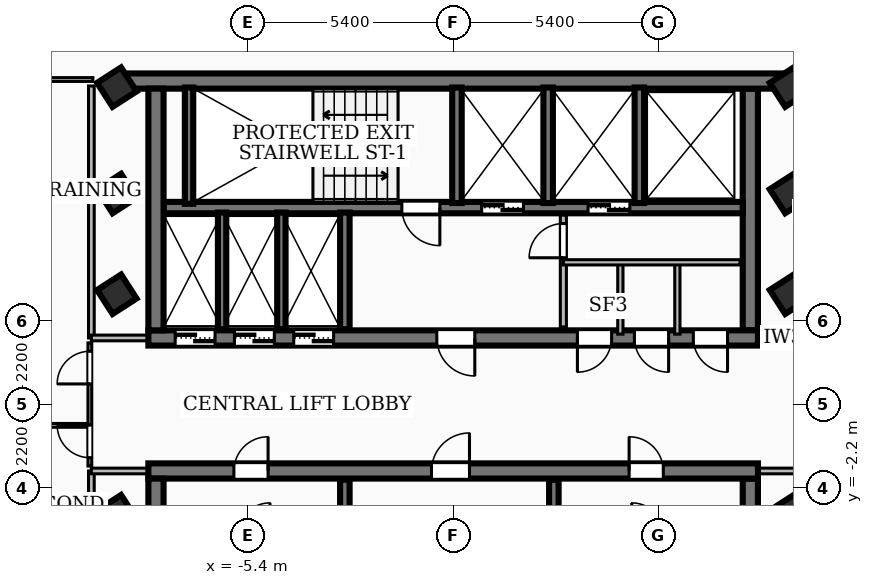
"""IFC4 building model, lengths in metres.
Left out: names, types, materials, properties, quantities, classifications, styles, units other than length and angle.
Written with IfcOpenShell. Run it as: python <this file> out.ifc"""

import sys

from ifc_helpers import new_model, si_unit, direction, frame, frame_2d, origin, origin_2d, place, context, subcontext, project, spatial, rectangle, extrude, element, fill, save


model = new_model("IFC4")
c1 = context("Model", 3, precision=1e-05, world=origin(), true_north=direction((0.0, 1.0)))
c2 = subcontext(c1, "Body", "Model", "MODEL_VIEW")
j1 = project(units=[si_unit("LENGTHUNIT", "METRE"), si_unit("PLANEANGLEUNIT", "RADIAN")], contexts=[c1])
p1 = place(None, origin())
s1 = spatial("IfcSite", under=j1, at=p1, CompositionType="ELEMENT")
p2 = place(p1, origin())
s2 = spatial("IfcBuilding", under=s1, at=p2, CompositionType="ELEMENT")
p3 = place(p2, frame((0.0, 0.0, 218.88)))
s3 = spatial("IfcBuildingStorey", under=s2, at=p3, CompositionType="ELEMENT", Elevation=218.88)
p4 = place(p3, frame((-8.78, 8.51, 0.0), z_axis=(0.0, 0.0, 1.0), x_axis=(1.0, 0.0, 0.0)))
e1 = element("IfcWall", 1, at=p4, inside=s3, PredefinedType="SHEAR", context=c2, shape_type="SweptSolid", body=[
    extrude(rectangle(XDim=17.56, YDim=0.4, at=frame_2d((8.78, 0.0))), origin(), (0.0, 0.0, 1.0), 3.14),
])
p5 = place(p3, frame((8.02, 1.75, 0.0), z_axis=(0.0, 0.0, 1.0), x_axis=(-1.0, 0.0, 0.0)))
e2 = element("IfcWall", 2, at=p5, inside=s3, PredefinedType="SHEAR", context=c2, shape_type="SweptSolid", body=[
    extrude(rectangle(XDim=16.04, YDim=0.4, at=frame_2d((8.02, 0.0))), origin(), (0.0, 0.0, 1.0), 3.14),
])
p6 = place(p5, frame((7.45, 0.0, 0.0)))
e3 = element("IfcOpeningElement", 3, at=p6, cuts=e2, PredefinedType="OPENING", context=c2, shape_type="SweptSolid", body=[
    extrude(rectangle(XDim=1.0, YDim=2.1, at=frame_2d((0.5, 1.05))), frame((0.0, 0.21, 0.0), z_axis=(0.0, -1.0, 0.0), x_axis=(1.0, 0.0, 0.0)), (0.0, 0.0, 1.0), 0.42),
])
p7 = place(p5, frame((14.285, 0.0, 0.0)))
e4 = element("IfcOpeningElement", 4, at=p7, cuts=e2, PredefinedType="OPENING", context=c2, shape_type="SweptSolid", body=[
    extrude(rectangle(XDim=1.05, YDim=2.15, at=frame_2d((0.525, 1.075))), frame((0.0, 0.21, 0.0), z_axis=(0.0, -1.0, 0.0), x_axis=(1.0, 0.0, 0.0)), (0.0, 0.0, 1.0), 0.42),
])
p8 = place(p5, frame((12.725, 0.0, 0.0)))
e5 = element("IfcOpeningElement", 5, at=p8, cuts=e2, PredefinedType="OPENING", context=c2, shape_type="SweptSolid", body=[
    extrude(rectangle(XDim=1.05, YDim=2.15, at=frame_2d((0.525, 1.075))), frame((0.0, 0.21, 0.0), z_axis=(0.0, -1.0, 0.0), x_axis=(1.0, 0.0, 0.0)), (0.0, 0.0, 1.0), 0.42),
])
p9 = place(p5, frame((11.165, 0.0, 0.0)))
e6 = element("IfcOpeningElement", 6, at=p9, cuts=e2, PredefinedType="OPENING", context=c2, shape_type="SweptSolid", body=[
    extrude(rectangle(XDim=1.05, YDim=2.15, at=frame_2d((0.525, 1.075))), frame((0.0, 0.21, 0.0), z_axis=(0.0, -1.0, 0.0), x_axis=(1.0, 0.0, 0.0)), (0.0, 0.0, 1.0), 0.42),
])
p10 = place(p5, frame((3.85, 0.0, 0.0)))
e7 = element("IfcOpeningElement", 7, at=p10, cuts=e2, PredefinedType="OPENING", context=c2, shape_type="SweptSolid", body=[
    extrude(rectangle(XDim=0.9, YDim=2.06, at=frame_2d((0.45, 1.03))), frame((0.0, 0.21, 0.0), z_axis=(0.0, -1.0, 0.0), x_axis=(1.0, 0.0, 0.0)), (0.0, 0.0, 1.0), 0.42),
])
p11 = place(p5, frame((2.35, 0.0, 0.0)))
e8 = element("IfcOpeningElement", 8, at=p11, cuts=e2, PredefinedType="OPENING", context=c2, shape_type="SweptSolid", body=[
    extrude(rectangle(XDim=0.9, YDim=2.06, at=frame_2d((0.45, 1.03))), frame((0.0, 0.21, 0.0), z_axis=(0.0, -1.0, 0.0), x_axis=(1.0, 0.0, 0.0)), (0.0, 0.0, 1.0), 0.42),
])
p12 = place(p5, frame((0.8, 0.0, 0.0)))
e9 = element("IfcOpeningElement", 9, at=p12, cuts=e2, PredefinedType="OPENING", context=c2, shape_type="SweptSolid", body=[
    extrude(rectangle(XDim=0.9, YDim=2.06, at=frame_2d((0.45, 1.03))), frame((0.0, 0.21, 0.0), z_axis=(0.0, -1.0, 0.0), x_axis=(1.0, 0.0, 0.0)), (0.0, 0.0, 1.0), 0.42),
])
for number, where, z_axis, x_axis in (
    (10, (-7.82, 1.95, 0.0), (0.0, 0.0, 1.0), (0.0, 1.0, 0.0)),
    (11, (7.82, 8.31, 0.0), (0.0, 0.0, 1.0), (0.0, -1.0, 0.0)),
):
    element("IfcWall", number, at=place(p3, frame(where, z_axis=z_axis, x_axis=x_axis)), inside=s3, PredefinedType="SHEAR", context=c2, shape_type="SweptSolid", body=[
        extrude(rectangle(XDim=6.36, YDim=0.4, at=frame_2d((3.18, 0.0))), origin(), (0.0, 0.0, 1.0), 3.14),
    ])
p13 = place(p3, frame((7.62, 5.18, 0.0), z_axis=(0.0, 0.0, 1.0), x_axis=(-1.0, 0.0, 0.0)))
e12 = element("IfcWall", 12, at=p13, inside=s3, PredefinedType="SOLIDWALL", context=c2, shape_type="SweptSolid", body=[
    extrude(rectangle(XDim=15.24, YDim=0.3, at=frame_2d((7.62, 0.0))), origin(), (0.0, 0.0, 1.0), 3.14),
])
p14 = place(p13, frame((5.77, 0.0, 0.0)))
e13 = element("IfcOpeningElement", 13, at=p14, cuts=e12, PredefinedType="OPENING", context=c2, shape_type="SweptSolid", body=[
    extrude(rectangle(XDim=1.1, YDim=2.15, at=frame_2d((0.55, 1.075))), frame((0.0, 0.16, 0.0), z_axis=(0.0, -1.0, 0.0), x_axis=(1.0, 0.0, 0.0)), (0.0, 0.0, 1.0), 0.32),
])
p15 = place(p13, frame((2.97, 0.0, 0.0)))
e14 = element("IfcOpeningElement", 14, at=p15, cuts=e12, PredefinedType="OPENING", context=c2, shape_type="SweptSolid", body=[
    extrude(rectangle(XDim=1.1, YDim=2.15, at=frame_2d((0.55, 1.075))), frame((0.0, 0.16, 0.0), z_axis=(0.0, -1.0, 0.0), x_axis=(1.0, 0.0, 0.0)), (0.0, 0.0, 1.0), 0.32),
])
p16 = place(p13, frame((7.97, 0.0, 0.0)))
e15 = element("IfcOpeningElement", 15, at=p16, cuts=e12, PredefinedType="OPENING", context=c2, shape_type="SweptSolid", body=[
    extrude(rectangle(XDim=1.0, YDim=2.1, at=frame_2d((0.5, 1.05))), frame((0.0, 0.16, 0.0), z_axis=(0.0, -1.0, 0.0), x_axis=(1.0, 0.0, 0.0)), (0.0, 0.0, 1.0), 0.32),
])
p17 = place(p3, frame((-8.02, -1.75, 0.0), z_axis=(0.0, 0.0, 1.0), x_axis=(1.0, 0.0, 0.0)))
e16 = element("IfcWall", 16, at=p17, inside=s3, PredefinedType="SHEAR", context=c2, shape_type="SweptSolid", body=[
    extrude(rectangle(XDim=16.04, YDim=0.4, at=frame_2d((8.02, 0.0))), origin(), (0.0, 0.0, 1.0), 3.14),
])
p18 = place(p17, frame((7.45, 0.0, 0.0)))
e17 = element("IfcOpeningElement", 17, at=p18, cuts=e16, PredefinedType="OPENING", context=c2, shape_type="SweptSolid", body=[
    extrude(rectangle(XDim=1.0, YDim=2.1, at=frame_2d((0.5, 1.05))), frame((0.0, 0.21, 0.0), z_axis=(0.0, -1.0, 0.0), x_axis=(1.0, 0.0, 0.0)), (0.0, 0.0, 1.0), 0.42),
])
p19 = place(p17, frame((12.65, 0.0, 0.0)))
e18 = element("IfcOpeningElement", 18, at=p19, cuts=e16, PredefinedType="OPENING", context=c2, shape_type="SweptSolid", body=[
    extrude(rectangle(XDim=0.9, YDim=2.06, at=frame_2d((0.45, 1.03))), frame((0.0, 0.21, 0.0), z_axis=(0.0, -1.0, 0.0), x_axis=(1.0, 0.0, 0.0)), (0.0, 0.0, 1.0), 0.42),
])
p20 = place(p17, frame((2.25, 0.0, 0.0)))
e19 = element("IfcOpeningElement", 19, at=p20, cuts=e16, PredefinedType="OPENING", context=c2, shape_type="SweptSolid", body=[
    extrude(rectangle(XDim=0.9, YDim=2.06, at=frame_2d((0.45, 1.03))), frame((0.0, 0.21, 0.0), z_axis=(0.0, -1.0, 0.0), x_axis=(1.0, 0.0, 0.0)), (0.0, 0.0, 1.0), 0.42),
])
for number, where, z_axis, x_axis in (
    (20, (-7.82, -8.31, 0.0), (0.0, 0.0, 1.0), (0.0, 1.0, 0.0)),
    (21, (7.82, -1.95, 0.0), (0.0, 0.0, 1.0), (0.0, -1.0, 0.0)),
):
    element("IfcWall", number, at=place(p3, frame(where, z_axis=z_axis, x_axis=x_axis)), inside=s3, PredefinedType="SHEAR", context=c2, shape_type="SweptSolid", body=[
        extrude(rectangle(XDim=6.36, YDim=0.4, at=frame_2d((3.18, 0.0))), origin(), (0.0, 0.0, 1.0), 3.14),
    ])
p21 = place(p3, frame((-6.95, 5.28, 0.0), z_axis=(0.0, 0.0, 1.0), x_axis=(0.0, 1.0, 0.0)))
e22 = element("IfcWall", 22, at=p21, inside=s3, PredefinedType="SOLIDWALL", context=c2, shape_type="SweptSolid", body=[
    extrude(rectangle(XDim=3.06, YDim=0.22, at=frame_2d((1.53, 0.0))), origin(), (0.0, 0.0, 1.0), 3.14),
])
for number, where, z_axis, x_axis in (
    (23, (0.1, 5.3, 0.0), (0.0, 0.0, 1.0), (0.0, 1.0, 0.0)),
    (24, (2.5, 5.3, 0.0), (0.0, 0.0, 1.0), (0.0, 1.0, 0.0)),
    (25, (4.9, 5.3, 0.0), (0.0, 0.0, 1.0), (0.0, 1.0, 0.0)),
):
    element("IfcWall", number, at=place(p3, frame(where, z_axis=z_axis, x_axis=x_axis)), inside=s3, PredefinedType="SOLIDWALL", context=c2, shape_type="SweptSolid", body=[
        extrude(rectangle(XDim=3.04, YDim=0.25, at=frame_2d((1.52, 0.0))), origin(), (0.0, 0.0, 1.0), 3.14),
    ])
for number, where, z_axis, x_axis in (
    (26, (-2.85, 1.98, 0.0), (0.0, 0.0, 1.0), (0.0, 1.0, 0.0)),
    (27, (-2.85, -5.05, 0.0), (0.0, 0.0, 1.0), (0.0, 1.0, 0.0)),
    (28, (2.65, -5.05, 0.0), (0.0, 0.0, 1.0), (0.0, 1.0, 0.0)),
):
    element("IfcWall", number, at=place(p3, frame(where, z_axis=z_axis, x_axis=x_axis)), inside=s3, PredefinedType="SOLIDWALL", context=c2, shape_type="SweptSolid", body=[
        extrude(rectangle(XDim=3.07, YDim=0.25, at=frame_2d((1.535, 0.0))), origin(), (0.0, 0.0, 1.0), 3.14),
    ])
for number, where, z_axis, x_axis in (
    (29, (-6.08, 1.98, 0.0), (0.0, 0.0, 1.0), (0.0, 1.0, 0.0)),
    (30, (-4.52, 1.98, 0.0), (0.0, 0.0, 1.0), (0.0, 1.0, 0.0)),
):
    element("IfcWall", number, at=place(p3, frame(where, z_axis=z_axis, x_axis=x_axis)), inside=s3, PredefinedType="SOLIDWALL", context=c2, shape_type="SweptSolid", body=[
        extrude(rectangle(XDim=3.07, YDim=0.22, at=frame_2d((1.535, 0.0))), origin(), (0.0, 0.0, 1.0), 3.14),
    ])
for number, where, z_axis, x_axis in (
    (31, (-8.85, -2.9, 0.0), (0.0, 0.0, 1.0), (0.841, 0.542, 0.0)),
    (32, (-8.85, 2.9, 0.0), (0.0, 0.0, 1.0), (0.841, 0.542, 0.0)),
    (33, (-8.85, 5.55, 0.0), (0.0, 0.0, 1.0), (0.841, 0.542, 0.0)),
    (34, (8.85, -2.9, 0.0), (0.0, 0.0, 1.0), (0.841, 0.542, 0.0)),
    (35, (8.85, 2.9, 0.0), (0.0, 0.0, 1.0), (0.841, 0.542, 0.0)),
    (36, (8.85, 5.55, 0.0), (0.0, 0.0, 1.0), (0.841, 0.542, 0.0)),
    (37, (-8.85, 8.35, 0.0), (0.0, 0.0, 1.0), (0.841, 0.542, 0.0)),
    (38, (8.85, 8.35, 0.0), (0.0, 0.0, 1.0), (0.841, 0.542, 0.0)),
):
    element("IfcColumn", number, at=place(p3, frame(where, z_axis=z_axis, x_axis=x_axis)), inside=s3, PredefinedType="COLUMN", context=c2, shape_type="SweptSolid", body=[
        extrude(rectangle(XDim=0.75, YDim=0.75, at=origin_2d()), origin(), (0.0, 0.0, 1.0), 3.42),
    ])
p22 = place(p3, frame((-5.124, -18.723, 0.0), z_axis=(0.0, 0.0, 1.0), x_axis=(-0.541724400477, 0.840556169407, 0.0)))
e39 = element("IfcWall", 39, at=p22, inside=s3, PredefinedType="SOLIDWALL", context=c2, shape_type="SweptSolid", body=[
    extrude(rectangle(XDim=25.925, YDim=0.2, at=frame_2d((12.962, 0.0))), origin(), (0.0, 0.0, 1.0), 3.14),
])
p23 = place(p22, frame((19.321, 0.0, 0.85)))
e40 = element("IfcOpeningElement", 40, at=p23, cuts=e39, PredefinedType="OPENING", context=c2, shape_type="SweptSolid", body=[
    extrude(rectangle(XDim=1.8, YDim=1.8, at=frame_2d((0.9, 0.9))), frame((0.0, 0.11, 0.0), z_axis=(0.0, -1.0, 0.0), x_axis=(1.0, 0.0, 0.0)), (0.0, 0.0, 1.0), 0.22),
])
p24 = place(p3, frame((2.9, 2.04, 0.0), z_axis=(0.0, 0.0, 1.0), x_axis=(0.0, 1.0, 0.0)))
e41 = element("IfcWall", 41, at=p24, inside=s3, PredefinedType="PARTITIONING", context=c2, shape_type="SweptSolid", body=[
    extrude(rectangle(XDim=2.94, YDim=0.16, at=frame_2d((1.47, 0.0))), origin(), (0.0, 0.0, 1.0), 2.37),
])
p25 = place(p24, frame((1.82, 0.0, 0.0)))
e42 = element("IfcOpeningElement", 42, at=p25, cuts=e41, PredefinedType="OPENING", context=c2, shape_type="SweptSolid", body=[
    extrude(rectangle(XDim=0.9, YDim=2.06, at=frame_2d((0.45, 1.03))), frame((0.0, 0.09, 0.0), z_axis=(0.0, -1.0, 0.0), x_axis=(1.0, 0.0, 0.0)), (0.0, 0.0, 1.0), 0.18),
])
p26 = place(p3, frame((2.9, 3.74, 0.0), z_axis=(0.0, 0.0, 1.0), x_axis=(1.0, 0.0, 0.0)))
e43 = element("IfcWall", 43, at=p26, inside=s3, PredefinedType="PARTITIONING", context=c2, shape_type="SweptSolid", body=[
    extrude(rectangle(XDim=4.65, YDim=0.138, at=frame_2d((2.325, 0.0))), origin(), (0.0, 0.0, 1.0), 3.14),
])
for number, where, z_axis, x_axis in (
    (44, (4.4, 1.85, 0.0), (0.0, 0.0, 1.0), (0.0, 1.0, 0.0)),
    (45, (5.9, 1.85, 0.0), (0.0, 0.0, 1.0), (0.0, 1.0, 0.0)),
):
    element("IfcWall", number, at=place(p3, frame(where, z_axis=z_axis, x_axis=x_axis)), inside=s3, PredefinedType="PARTITIONING", context=c2, shape_type="SweptSolid", body=[
        extrude(rectangle(XDim=1.89, YDim=0.138, at=frame_2d((0.945, 0.0))), origin(), (0.0, 0.0, 1.0), 2.37),
    ])
p27 = place(p3, frame((-9.52, 1.75, 0.0), z_axis=(0.0, 0.0, 1.0), x_axis=(0.0, 1.0, 0.0)))
e46 = element("IfcWall", 46, at=p27, inside=s3, PredefinedType="PARTITIONING", context=c2, shape_type="SweptSolid", body=[
    extrude(rectangle(XDim=6.63, YDim=0.15, at=frame_2d((3.315, 0.0))), origin(), (0.0, 0.0, 1.0), 3.14),
])
p28 = place(p3, frame((-7.85, 1.75, 0.0), z_axis=(0.0, 0.0, 1.0), x_axis=(-1.0, 0.0, 0.0)))
e47 = element("IfcWall", 47, at=p28, inside=s3, PredefinedType="PARTITIONING", context=c2, shape_type="SweptSolid", body=[
    extrude(rectangle(XDim=1.67, YDim=0.15, at=frame_2d((0.835, 0.0))), origin(), (0.0, 0.0, 1.0), 2.37),
])
p29 = place(p3, frame((-9.52, -8.38, 0.0), z_axis=(0.0, 0.0, 1.0), x_axis=(0.0, 1.0, 0.0)))
e48 = element("IfcWall", 48, at=p29, inside=s3, PredefinedType="PARTITIONING", context=c2, shape_type="SweptSolid", body=[
    extrude(rectangle(XDim=6.63, YDim=0.15, at=frame_2d((3.315, 0.0))), origin(), (0.0, 0.0, 1.0), 3.14),
])
for number, where, z_axis, x_axis in (
    (49, (-7.85, -1.75, 0.0), (0.0, 0.0, 1.0), (-1.0, 0.0, 0.0)),
    (50, (7.85, 1.75, 0.0), (0.0, 0.0, 1.0), (1.0, 0.0, 0.0)),
    (51, (7.85, -1.75, 0.0), (0.0, 0.0, 1.0), (1.0, 0.0, 0.0)),
):
    element("IfcWall", number, at=place(p3, frame(where, z_axis=z_axis, x_axis=x_axis)), inside=s3, PredefinedType="PARTITIONING", context=c2, shape_type="SweptSolid", body=[
        extrude(rectangle(XDim=1.67, YDim=0.15, at=frame_2d((0.835, 0.0))), origin(), (0.0, 0.0, 1.0), 2.37),
    ])
p30 = place(p3, frame((-16.759, -0.55, 0.0), z_axis=(0.0, 0.0, 1.0), x_axis=(1.0, 0.0, 0.0)))
e52 = element("IfcWall", 52, at=p30, inside=s3, PredefinedType="PARTITIONING", context=c2, shape_type="SweptSolid", body=[
    extrude(rectangle(XDim=7.099, YDim=0.1, at=frame_2d((3.55, 0.0))), origin(), (0.0, 0.0, 1.0), 3.14),
])
p31 = place(p3, frame((-13.306, 8.55, 0.0), z_axis=(0.0, 0.0, 1.0), x_axis=(1.0, 0.0, 0.0)))
e53 = element("IfcWall", 53, at=p31, inside=s3, PredefinedType="PARTITIONING", context=c2, shape_type="SweptSolid", body=[
    extrude(rectangle(XDim=3.826, YDim=0.1, at=frame_2d((1.913, 0.0))), origin(), (0.0, 0.0, 1.0), 2.51),
])
p32 = place(p3, frame((-9.56, -1.62, 0.0), z_axis=(0.0, 0.0, 1.0), x_axis=(0.0, 1.0, 0.0)))
e54 = element("IfcWall", 54, at=p32, inside=s3, PredefinedType="PARTITIONING", context=c2, shape_type="SweptSolid", body=[
    extrude(rectangle(XDim=3.24, YDim=0.1, at=frame_2d((1.62, 0.0))), origin(), (0.0, 0.0, 1.0), 3.14),
])
p33 = place(p32, frame((0.22, 0.0, 0.0)))
e55 = element("IfcOpeningElement", 55, at=p33, cuts=e54, PredefinedType="OPENING", context=c2, shape_type="SweptSolid", body=[
    extrude(rectangle(XDim=0.86, YDim=2.04, at=frame_2d((0.43, 1.02))), frame((0.0, 0.06, 0.0), z_axis=(0.0, -1.0, 0.0), x_axis=(1.0, 0.0, 0.0)), (0.0, 0.0, 1.0), 0.12),
])
p34 = place(p32, frame((2.16, 0.0, 0.0)))
e56 = element("IfcOpeningElement", 56, at=p34, cuts=e54, PredefinedType="OPENING", context=c2, shape_type="SweptSolid", body=[
    extrude(rectangle(XDim=0.86, YDim=2.04, at=frame_2d((0.43, 1.02))), frame((0.0, 0.06, 0.0), z_axis=(0.0, -1.0, 0.0), x_axis=(1.0, 0.0, 0.0)), (0.0, 0.0, 1.0), 0.12),
])
p35 = place(p3, frame((11.27, 8.893, 0.0), z_axis=(0.0, 0.0, 1.0), x_axis=(-0.541761070726, 0.840532534912, 0.0)))
e57 = element("IfcWall", 57, at=p35, inside=s3, PredefinedType="PARTITIONING", context=c2, shape_type="SweptSolid", body=[
    extrude(rectangle(XDim=8.149, YDim=0.1, at=frame_2d((4.075, 0.0))), origin(), (0.0, 0.0, 1.0), 2.51),
])
p36 = place(p3, frame((-16.331, 6.476, 0.0), z_axis=(0.0, 0.0, 1.0), x_axis=(0.840579457381, 0.541688264437, 0.0)))
e58 = element("IfcWall", 58, at=p36, inside=s3, PredefinedType="PARTITIONING", context=c2, shape_type="SweptSolid", body=[
    extrude(rectangle(XDim=20.238, YDim=0.1, at=frame_2d((10.119, 0.0))), origin(), (0.0, 0.0, 1.0), 2.51),
])
p37 = place(p36, frame((9.619, 0.0, 0.0)))
e59 = element("IfcOpeningElement", 59, at=p37, cuts=e58, PredefinedType="OPENING", context=c2, shape_type="SweptSolid", body=[
    extrude(rectangle(XDim=1.2, YDim=2.1, at=frame_2d((0.6, 1.05))), frame((0.0, 0.06, 0.0), z_axis=(0.0, -1.0, 0.0), x_axis=(1.0, 0.0, 0.0)), (0.0, 0.0, 1.0), 0.12),
])
p38 = place(p6, origin())
e60 = element("IfcDoor", 60, at=p38, inside=s3, OperationType="SINGLE_SWING_LEFT", PredefinedType="DOOR", context=c2, shape_type="SweptSolid", body=[
    extrude(rectangle(XDim=1.0, YDim=2.1, at=frame_2d((0.5, 1.05))), frame((0.0, 0.025, 0.0), z_axis=(0.0, -1.0, 0.0), x_axis=(1.0, 0.0, 0.0)), (0.0, 0.0, 1.0), 0.05),
])
fill(e3, e60)
p39 = place(p18, origin())
e61 = element("IfcDoor", 61, at=p39, inside=s3, OperationType="SINGLE_SWING_RIGHT", PredefinedType="DOOR", context=c2, shape_type="SweptSolid", body=[
    extrude(rectangle(XDim=1.0, YDim=2.1, at=frame_2d((0.5, 1.05))), frame((0.0, 0.025, 0.0), z_axis=(0.0, -1.0, 0.0), x_axis=(1.0, 0.0, 0.0)), (0.0, 0.0, 1.0), 0.05),
])
fill(e17, e61)
p40 = place(p14, origin())
e62 = element("IfcDoor", 62, at=p40, inside=s3, OperationType="DOUBLE_DOOR_SLIDING", PredefinedType="DOOR", context=c2, shape_type="SweptSolid", body=[
    extrude(rectangle(XDim=1.1, YDim=2.15, at=frame_2d((0.55, 1.075))), frame((0.0, 0.025, 0.0), z_axis=(0.0, -1.0, 0.0), x_axis=(1.0, 0.0, 0.0)), (0.0, 0.0, 1.0), 0.05),
])
fill(e13, e62)
p41 = place(p15, origin())
e63 = element("IfcDoor", 63, at=p41, inside=s3, OperationType="DOUBLE_DOOR_SLIDING", PredefinedType="DOOR", context=c2, shape_type="SweptSolid", body=[
    extrude(rectangle(XDim=1.1, YDim=2.15, at=frame_2d((0.55, 1.075))), frame((0.0, 0.025, 0.0), z_axis=(0.0, -1.0, 0.0), x_axis=(1.0, 0.0, 0.0)), (0.0, 0.0, 1.0), 0.05),
])
fill(e14, e63)
p42 = place(p16, origin())
e64 = element("IfcDoor", 64, at=p42, inside=s3, OperationType="SINGLE_SWING_LEFT", PredefinedType="DOOR", context=c2, shape_type="SweptSolid", body=[
    extrude(rectangle(XDim=1.0, YDim=2.1, at=frame_2d((0.5, 1.05))), frame((0.0, 0.025, 0.0), z_axis=(0.0, -1.0, 0.0), x_axis=(1.0, 0.0, 0.0)), (0.0, 0.0, 1.0), 0.05),
])
fill(e15, e64)
p43 = place(p7, origin())
e65 = element("IfcDoor", 65, at=p43, inside=s3, OperationType="DOUBLE_DOOR_SLIDING", PredefinedType="DOOR", context=c2, shape_type="SweptSolid", body=[
    extrude(rectangle(XDim=1.05, YDim=2.15, at=frame_2d((0.525, 1.075))), frame((0.0, 0.025, 0.0), z_axis=(0.0, -1.0, 0.0), x_axis=(1.0, 0.0, 0.0)), (0.0, 0.0, 1.0), 0.05),
])
fill(e4, e65)
p44 = place(p8, origin())
e66 = element("IfcDoor", 66, at=p44, inside=s3, OperationType="DOUBLE_DOOR_SLIDING", PredefinedType="DOOR", context=c2, shape_type="SweptSolid", body=[
    extrude(rectangle(XDim=1.05, YDim=2.15, at=frame_2d((0.525, 1.075))), frame((0.0, 0.025, 0.0), z_axis=(0.0, -1.0, 0.0), x_axis=(1.0, 0.0, 0.0)), (0.0, 0.0, 1.0), 0.05),
])
fill(e5, e66)
p45 = place(p9, origin())
e67 = element("IfcDoor", 67, at=p45, inside=s3, OperationType="DOUBLE_DOOR_SLIDING", PredefinedType="DOOR", context=c2, shape_type="SweptSolid", body=[
    extrude(rectangle(XDim=1.05, YDim=2.15, at=frame_2d((0.525, 1.075))), frame((0.0, 0.025, 0.0), z_axis=(0.0, -1.0, 0.0), x_axis=(1.0, 0.0, 0.0)), (0.0, 0.0, 1.0), 0.05),
])
fill(e6, e67)
p46 = place(p19, origin())
e68 = element("IfcDoor", 68, at=p46, inside=s3, OperationType="SINGLE_SWING_LEFT", PredefinedType="DOOR", context=c2, shape_type="SweptSolid", body=[
    extrude(rectangle(XDim=0.9, YDim=2.06, at=frame_2d((0.45, 1.03))), frame((0.0, 0.025, 0.0), z_axis=(0.0, -1.0, 0.0), x_axis=(1.0, 0.0, 0.0)), (0.0, 0.0, 1.0), 0.05),
])
fill(e18, e68)
p47 = place(p20, origin())
e69 = element("IfcDoor", 69, at=p47, inside=s3, OperationType="SINGLE_SWING_RIGHT", PredefinedType="DOOR", context=c2, shape_type="SweptSolid", body=[
    extrude(rectangle(XDim=0.9, YDim=2.06, at=frame_2d((0.45, 1.03))), frame((0.0, 0.025, 0.0), z_axis=(0.0, -1.0, 0.0), x_axis=(1.0, 0.0, 0.0)), (0.0, 0.0, 1.0), 0.05),
])
fill(e19, e69)
p48 = place(p10, origin())
e70 = element("IfcDoor", 70, at=p48, inside=s3, OperationType="SINGLE_SWING_RIGHT", PredefinedType="DOOR", context=c2, shape_type="SweptSolid", body=[
    extrude(rectangle(XDim=0.9, YDim=2.06, at=frame_2d((0.45, 1.03))), frame((0.0, 0.025, 0.0), z_axis=(0.0, -1.0, 0.0), x_axis=(1.0, 0.0, 0.0)), (0.0, 0.0, 1.0), 0.05),
])
fill(e7, e70)
p49 = place(p11, origin())
e71 = element("IfcDoor", 71, at=p49, inside=s3, OperationType="SINGLE_SWING_LEFT", PredefinedType="DOOR", context=c2, shape_type="SweptSolid", body=[
    extrude(rectangle(XDim=0.9, YDim=2.06, at=frame_2d((0.45, 1.03))), frame((0.0, 0.025, 0.0), z_axis=(0.0, -1.0, 0.0), x_axis=(1.0, 0.0, 0.0)), (0.0, 0.0, 1.0), 0.05),
])
fill(e8, e71)
p50 = place(p12, origin())
e72 = element("IfcDoor", 72, at=p50, inside=s3, OperationType="SINGLE_SWING_LEFT", PredefinedType="DOOR", context=c2, shape_type="SweptSolid", body=[
    extrude(rectangle(XDim=0.9, YDim=2.06, at=frame_2d((0.45, 1.03))), frame((0.0, 0.025, 0.0), z_axis=(0.0, -1.0, 0.0), x_axis=(1.0, 0.0, 0.0)), (0.0, 0.0, 1.0), 0.05),
])
fill(e9, e72)
p51 = place(p25, origin())
e73 = element("IfcDoor", 73, at=p51, inside=s3, OperationType="SINGLE_SWING_LEFT", PredefinedType="DOOR", context=c2, shape_type="SweptSolid", body=[
    extrude(rectangle(XDim=0.9, YDim=2.06, at=frame_2d((0.45, 1.03))), frame((0.0, 0.025, 0.0), z_axis=(0.0, -1.0, 0.0), x_axis=(1.0, 0.0, 0.0)), (0.0, 0.0, 1.0), 0.05),
])
fill(e42, e73)
p52 = place(p33, origin())
e74 = element("IfcDoor", 74, at=p52, inside=s3, OperationType="SINGLE_SWING_RIGHT", PredefinedType="DOOR", context=c2, shape_type="SweptSolid", body=[
    extrude(rectangle(XDim=0.86, YDim=2.04, at=frame_2d((0.43, 1.02))), frame((0.0, 0.025, 0.0), z_axis=(0.0, -1.0, 0.0), x_axis=(1.0, 0.0, 0.0)), (0.0, 0.0, 1.0), 0.05),
])
fill(e55, e74)
p53 = place(p34, origin())
e75 = element("IfcDoor", 75, at=p53, inside=s3, OperationType="SINGLE_SWING_LEFT", PredefinedType="DOOR", context=c2, shape_type="SweptSolid", body=[
    extrude(rectangle(XDim=0.86, YDim=2.04, at=frame_2d((0.43, 1.02))), frame((0.0, 0.025, 0.0), z_axis=(0.0, -1.0, 0.0), x_axis=(1.0, 0.0, 0.0)), (0.0, 0.0, 1.0), 0.05),
])
fill(e56, e75)
save(model, sys.argv[1])
